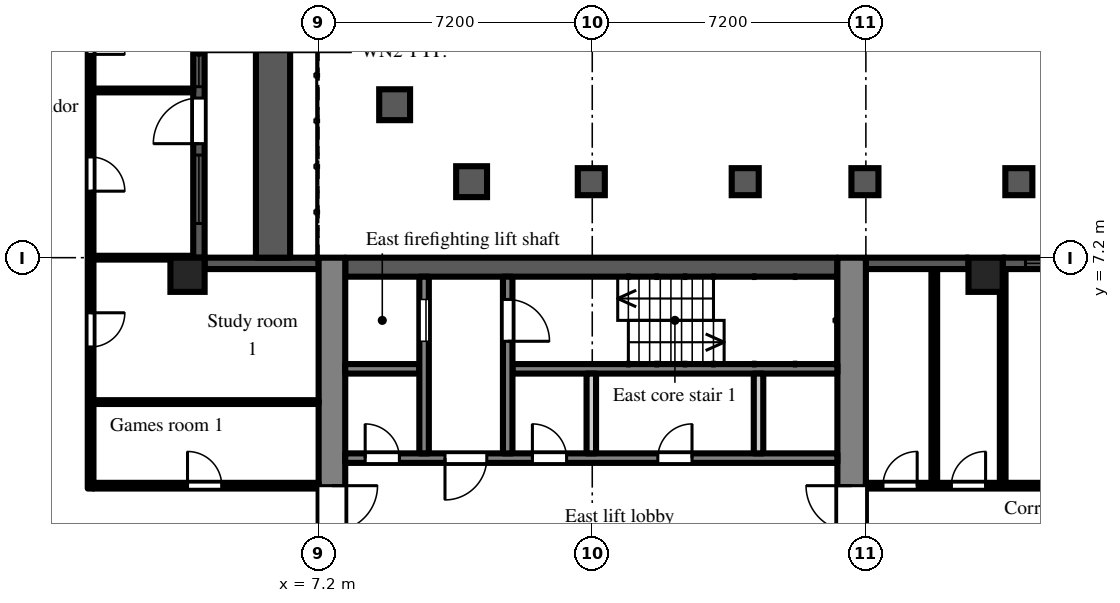
"""IFC4 building model, lengths in metres.
Left out: names, types, materials, properties, quantities, classifications, styles, units other than length and angle.
Written with IfcOpenShell. Run it as: python <this file> out.ifc"""

import sys

from ifc_helpers import new_model, si_unit, direction, frame, frame_2d, origin, origin_2d, place, context, subcontext, project, spatial, rectangle, extrude, element, fill, save


model = new_model("IFC4")
c1 = context("Model", 3, precision=1e-05, world=origin(), true_north=direction((0.0, 1.0)))
c2 = subcontext(c1, "Body", "Model", "MODEL_VIEW")
j1 = project(units=[si_unit("LENGTHUNIT", "METRE"), si_unit("PLANEANGLEUNIT", "RADIAN")], contexts=[c1])
p1 = place(None, origin())
s1 = spatial("IfcSite", under=j1, at=p1, CompositionType="ELEMENT")
p2 = place(p1, origin())
s2 = spatial("IfcBuilding", under=s1, at=p2, CompositionType="ELEMENT")
p3 = place(p2, frame((0.0, 0.0, 108.9)))
s3 = spatial("IfcBuildingStorey", under=s2, at=p3, CompositionType="ELEMENT", Elevation=108.9)
for number, where, z_axis, x_axis in (
    (1, (3.75, 6.75, 0.0), (0.0, 0.0, 1.0), (1.0, 0.0, 0.0)),
    (2, (24.75, 6.75, 0.0), (0.0, 0.0, 1.0), (1.0, 0.0, 0.0)),
):
    element("IfcColumn", number, at=place(p3, frame(where, z_axis=z_axis, x_axis=x_axis)), inside=s3, PredefinedType="COLUMN", context=c2, shape_type="SweptSolid", body=[
        extrude(rectangle(XDim=0.9, YDim=0.9, at=origin_2d()), origin(), (0.0, 0.0, 1.0), 3.0),
    ])
p4 = place(p3, frame((28.35, 7.05, 0.0), z_axis=(0.0, 0.0, 1.0), x_axis=(-1.0, 0.0, 0.0)))
e3 = element("IfcWall", 3, at=p4, inside=s3, PredefinedType="SOLIDWALL", context=c2, shape_type="SweptSolid", body=[
    extrude(rectangle(XDim=3.15, YDim=0.3, at=frame_2d((1.575, 0.0))), origin(), (0.0, 0.0, 1.0), 2.2),
])
p5 = place(p4, frame((0.15, 0.0, 0.2)))
e4 = element("IfcOpeningElement", 4, at=p5, cuts=e3, PredefinedType="OPENING", context=c2, shape_type="SweptSolid", body=[
    extrude(rectangle(XDim=2.4, YDim=1.85, at=frame_2d((1.2, 0.925))), frame((0.0, 0.16, 0.0), z_axis=(0.0, -1.0, 0.0), x_axis=(1.0, 0.0, 0.0)), (0.0, 0.0, 1.0), 0.32),
])
p6 = place(p3, frame((24.3, 7.05, 0.0), z_axis=(0.0, 0.0, 1.0), x_axis=(-1.0, 0.0, 0.0)))
e5 = element("IfcWall", 5, at=p6, inside=s3, PredefinedType="SOLIDWALL", context=c2, shape_type="SweptSolid", body=[
    extrude(rectangle(XDim=2.7, YDim=0.3, at=frame_2d((1.35, 0.0))), origin(), (0.0, 0.0, 1.0), 2.2),
])
p7 = place(p3, frame((7.2, 7.05, 0.0), z_axis=(0.0, 0.0, 1.0), x_axis=(-1.0, 0.0, 0.0)))
e6 = element("IfcWall", 6, at=p7, inside=s3, PredefinedType="SOLIDWALL", context=c2, shape_type="SweptSolid", body=[
    extrude(rectangle(XDim=3.0, YDim=0.3, at=frame_2d((1.5, 0.0))), origin(), (0.0, 0.0, 1.0), 2.55),
])
p8 = place(p3, frame((4.05, 7.2, 0.0), z_axis=(0.0, 0.0, 1.0), x_axis=(0.0, 1.0, 0.0)))
e7 = element("IfcWall", 7, at=p8, inside=s3, PredefinedType="SOLIDWALL", context=c2, shape_type="SweptSolid", body=[
    extrude(rectangle(XDim=7.2, YDim=0.3, at=frame_2d((3.6, 0.0))), origin(), (0.0, 0.0, 1.0), 2.55),
])
p9 = place(p8, frame((3.0, 0.0, 0.0)))
e8 = element("IfcOpeningElement", 8, at=p9, cuts=e7, PredefinedType="OPENING", context=c2, shape_type="SweptSolid", body=[
    extrude(rectangle(XDim=1.2, YDim=2.05, at=frame_2d((0.6, 1.025))), frame((0.0, 0.16, 0.0), z_axis=(0.0, -1.0, 0.0), x_axis=(1.0, 0.0, 0.0)), (0.0, 0.0, 1.0), 0.32),
])
p10 = place(p8, frame((0.9, 0.0, 0.2)))
e9 = element("IfcOpeningElement", 9, at=p10, cuts=e7, PredefinedType="OPENING", context=c2, shape_type="SweptSolid", body=[
    extrude(rectangle(XDim=1.8, YDim=1.85, at=frame_2d((0.9, 0.925))), frame((0.0, 0.16, 0.0), z_axis=(0.0, -1.0, 0.0), x_axis=(1.0, 0.0, 0.0)), (0.0, 0.0, 1.0), 0.32),
])
p11 = place(p8, frame((4.5, 0.0, 0.2)))
e10 = element("IfcOpeningElement", 10, at=p11, cuts=e7, PredefinedType="OPENING", context=c2, shape_type="SweptSolid", body=[
    extrude(rectangle(XDim=1.8, YDim=1.85, at=frame_2d((0.9, 0.925))), frame((0.0, 0.16, 0.0), z_axis=(0.0, -1.0, 0.0), x_axis=(1.0, 0.0, 0.0)), (0.0, 0.0, 1.0), 0.32),
])
p12 = place(p3, frame((6.0, 7.2, 0.0), z_axis=(0.0, 0.0, 1.0), x_axis=(0.0, 1.0, 0.0)))
e11 = element("IfcWall", 11, at=p12, inside=s3, PredefinedType="PARAPET", context=c2, shape_type="SweptSolid", body=[
    extrude(rectangle(XDim=7.2, YDim=0.9, at=frame_2d((3.6, 0.0))), origin(), (0.0, 0.0, 1.0), 0.8),
])
p13 = place(p3, frame((7.55, -7.2, 0.0), z_axis=(0.0, 0.0, 1.0), x_axis=(0.0, 1.0, 0.0)))
e12 = element("IfcWall", 12, at=p13, inside=s3, PredefinedType="SHEAR", context=c2, shape_type="SweptSolid", body=[
    extrude(rectangle(XDim=14.4, YDim=0.7, at=frame_2d((7.2, 0.0))), origin(), (0.0, 0.0, 1.0), 2.55),
])
p14 = place(p13, frame((6.0, 0.0, 0.0)))
e13 = element("IfcOpeningElement", 13, at=p14, cuts=e12, PredefinedType="OPENING", context=c2, shape_type="SweptSolid", body=[
    extrude(rectangle(XDim=2.4, YDim=2.2, at=frame_2d((1.2, 1.1))), frame((0.0, 0.36, 0.0), z_axis=(0.0, -1.0, 0.0), x_axis=(1.0, 0.0, 0.0)), (0.0, 0.0, 1.0), 0.72),
])
p15 = place(p3, frame((21.225, -7.2, 0.0), z_axis=(0.0, 0.0, 1.0), x_axis=(0.0, 1.0, 0.0)))
e14 = element("IfcWall", 14, at=p15, inside=s3, PredefinedType="SHEAR", context=c2, shape_type="SweptSolid", body=[
    extrude(rectangle(XDim=14.4, YDim=0.75, at=frame_2d((7.2, 0.0))), origin(), (0.0, 0.0, 1.0), 2.55),
])
p16 = place(p15, frame((6.0, 0.0, 0.0)))
e15 = element("IfcOpeningElement", 15, at=p16, cuts=e14, PredefinedType="OPENING", context=c2, shape_type="SweptSolid", body=[
    extrude(rectangle(XDim=2.4, YDim=2.2, at=frame_2d((1.2, 1.1))), frame((0.0, 0.385, 0.0), z_axis=(0.0, -1.0, 0.0), x_axis=(1.0, 0.0, 0.0)), (0.0, 0.0, 1.0), 0.77),
])
p17 = place(p3, frame((7.9, 6.95, 0.0), z_axis=(0.0, 0.0, 1.0), x_axis=(1.0, 0.0, 0.0)))
e16 = element("IfcWall", 16, at=p17, inside=s3, PredefinedType="SHEAR", context=c2, shape_type="SweptSolid", body=[
    extrude(rectangle(XDim=12.95, YDim=0.5, at=frame_2d((6.475, 0.0))), origin(), (0.0, 0.0, 1.0), 2.55),
])
p18 = place(p3, frame((7.9, 1.925, 0.0), z_axis=(0.0, 0.0, 1.0), x_axis=(1.0, 0.0, 0.0)))
e17 = element("IfcWall", 17, at=p18, inside=s3, PredefinedType="SHEAR", context=c2, shape_type="SweptSolid", body=[
    extrude(rectangle(XDim=12.95, YDim=0.25, at=frame_2d((6.475, 0.0))), origin(), (0.0, 0.0, 1.0), 2.55),
])
p19 = place(p18, frame((0.525, 0.0, 0.0)))
e18 = element("IfcOpeningElement", 18, at=p19, cuts=e17, PredefinedType="OPENING", context=c2, shape_type="SweptSolid", body=[
    extrude(rectangle(XDim=0.9, YDim=2.1, at=frame_2d((0.45, 1.05))), frame((0.0, 0.135, 0.0), z_axis=(0.0, -1.0, 0.0), x_axis=(1.0, 0.0, 0.0)), (0.0, 0.0, 1.0), 0.27),
])
p20 = place(p18, frame((2.625, 0.0, 0.0)))
e19 = element("IfcOpeningElement", 19, at=p20, cuts=e17, PredefinedType="OPENING", context=c2, shape_type="SweptSolid", body=[
    extrude(rectangle(XDim=1.1, YDim=2.1, at=frame_2d((0.55, 1.05))), frame((0.0, 0.135, 0.0), z_axis=(0.0, -1.0, 0.0), x_axis=(1.0, 0.0, 0.0)), (0.0, 0.0, 1.0), 0.27),
])
p21 = place(p18, frame((4.925, 0.0, 0.0)))
e20 = element("IfcOpeningElement", 20, at=p21, cuts=e17, PredefinedType="OPENING", context=c2, shape_type="SweptSolid", body=[
    extrude(rectangle(XDim=0.9, YDim=2.1, at=frame_2d((0.45, 1.05))), frame((0.0, 0.135, 0.0), z_axis=(0.0, -1.0, 0.0), x_axis=(1.0, 0.0, 0.0)), (0.0, 0.0, 1.0), 0.27),
])
p22 = place(p18, frame((8.225, 0.0, 0.0)))
e21 = element("IfcOpeningElement", 21, at=p22, cuts=e17, PredefinedType="OPENING", context=c2, shape_type="SweptSolid", body=[
    extrude(rectangle(XDim=0.9, YDim=2.1, at=frame_2d((0.45, 1.05))), frame((0.0, 0.135, 0.0), z_axis=(0.0, -1.0, 0.0), x_axis=(1.0, 0.0, 0.0)), (0.0, 0.0, 1.0), 0.27),
])
p23 = place(p3, frame((7.9, 4.275, 0.0), z_axis=(0.0, 0.0, 1.0), x_axis=(1.0, 0.0, 0.0)))
e22 = element("IfcWall", 22, at=p23, inside=s3, PredefinedType="SHEAR", context=c2, shape_type="SweptSolid", body=[
    extrude(rectangle(XDim=1.95, YDim=0.25, at=frame_2d((0.975, 0.0))), origin(), (0.0, 0.0, 1.0), 2.55),
])
p24 = place(p3, frame((12.3, 4.275, 0.0), z_axis=(0.0, 0.0, 1.0), x_axis=(1.0, 0.0, 0.0)))
e23 = element("IfcWall", 23, at=p24, inside=s3, PredefinedType="SHEAR", context=c2, shape_type="SweptSolid", body=[
    extrude(rectangle(XDim=8.55, YDim=0.25, at=frame_2d((4.275, 0.0))), origin(), (0.0, 0.0, 1.0), 2.55),
])
p25 = place(p3, frame((9.975, 2.05, 0.0), z_axis=(0.0, 0.0, 1.0), x_axis=(0.0, 1.0, 0.0)))
e24 = element("IfcWall", 24, at=p25, inside=s3, PredefinedType="SHEAR", context=c2, shape_type="SweptSolid", body=[
    extrude(rectangle(XDim=4.65, YDim=0.25, at=frame_2d((2.325, 0.0))), origin(), (0.0, 0.0, 1.0), 2.55),
])
p26 = place(p25, frame((2.95, 0.0, 0.0)))
e25 = element("IfcOpeningElement", 25, at=p26, cuts=e24, PredefinedType="OPENING", context=c2, shape_type="SweptSolid", body=[
    extrude(rectangle(XDim=1.1, YDim=2.1, at=frame_2d((0.55, 1.05))), frame((0.0, 0.135, 0.0), z_axis=(0.0, -1.0, 0.0), x_axis=(1.0, 0.0, 0.0)), (0.0, 0.0, 1.0), 0.27),
])
p27 = place(p3, frame((12.175, 2.05, 0.0), z_axis=(0.0, 0.0, 1.0), x_axis=(0.0, 1.0, 0.0)))
e26 = element("IfcWall", 26, at=p27, inside=s3, PredefinedType="SHEAR", context=c2, shape_type="SweptSolid", body=[
    extrude(rectangle(XDim=4.65, YDim=0.25, at=frame_2d((2.325, 0.0))), origin(), (0.0, 0.0, 1.0), 2.55),
])
p28 = place(p27, frame((2.95, 0.0, 0.0)))
e27 = element("IfcOpeningElement", 27, at=p28, cuts=e26, PredefinedType="OPENING", context=c2, shape_type="SweptSolid", body=[
    extrude(rectangle(XDim=1.1, YDim=2.1, at=frame_2d((0.55, 1.05))), frame((0.0, 0.135, 0.0), z_axis=(0.0, -1.0, 0.0), x_axis=(1.0, 0.0, 0.0)), (0.0, 0.0, 1.0), 0.27),
])
for number, where, z_axis, x_axis in (
    (28, (14.375, 2.05, 0.0), (0.0, 0.0, 1.0), (0.0, 1.0, 0.0)),
    (29, (18.775, 2.05, 0.0), (0.0, 0.0, 1.0), (0.0, 1.0, 0.0)),
):
    element("IfcWall", number, at=place(p3, frame(where, z_axis=z_axis, x_axis=x_axis)), inside=s3, PredefinedType="PARTITIONING", context=c2, shape_type="SweptSolid", body=[
        extrude(rectangle(XDim=2.1, YDim=0.25, at=frame_2d((1.05, 0.0))), origin(), (0.0, 0.0, 1.0), 2.55),
    ])
p29 = place(p3, frame((1.2, 1.125, 0.0), z_axis=(0.0, 0.0, 1.0), x_axis=(0.0, 1.0, 0.0)))
e30 = element("IfcWall", 30, at=p29, inside=s3, PredefinedType="PARTITIONING", context=c2, shape_type="SweptSolid", body=[
    extrude(rectangle(XDim=16.8, YDim=0.15, at=frame_2d((8.4, 0.0))), origin(), (0.0, 0.0, 1.0), 2.55),
])
p30 = place(p29, frame((3.725, 0.0, 0.0)))
e31 = element("IfcOpeningElement", 31, at=p30, cuts=e30, PredefinedType="OPENING", context=c2, shape_type="SweptSolid", body=[
    extrude(rectangle(XDim=0.9, YDim=2.1, at=frame_2d((0.45, 1.05))), frame((0.0, 0.085, 0.0), z_axis=(0.0, -1.0, 0.0), x_axis=(1.0, 0.0, 0.0)), (0.0, 0.0, 1.0), 0.17),
])
p31 = place(p29, frame((11.425, 0.0, 0.0)))
e32 = element("IfcOpeningElement", 32, at=p31, cuts=e30, PredefinedType="OPENING", context=c2, shape_type="SweptSolid", body=[
    extrude(rectangle(XDim=0.9, YDim=2.1, at=frame_2d((0.45, 1.05))), frame((0.0, 0.085, 0.0), z_axis=(0.0, -1.0, 0.0), x_axis=(1.0, 0.0, 0.0)), (0.0, 0.0, 1.0), 0.17),
])
p32 = place(p29, frame((7.825, 0.0, 0.0)))
e33 = element("IfcOpeningElement", 33, at=p32, cuts=e30, PredefinedType="OPENING", context=c2, shape_type="SweptSolid", body=[
    extrude(rectangle(XDim=0.9, YDim=2.1, at=frame_2d((0.45, 1.05))), frame((0.0, 0.085, 0.0), z_axis=(0.0, -1.0, 0.0), x_axis=(1.0, 0.0, 0.0)), (0.0, 0.0, 1.0), 0.17),
])
p33 = place(p29, frame((13.475, 0.0, 0.0)))
e34 = element("IfcOpeningElement", 34, at=p33, cuts=e30, PredefinedType="OPENING", context=c2, shape_type="SweptSolid", body=[
    extrude(rectangle(XDim=1.0, YDim=2.1, at=frame_2d((0.5, 1.05))), frame((0.0, 0.085, 0.0), z_axis=(0.0, -1.0, 0.0), x_axis=(1.0, 0.0, 0.0)), (0.0, 0.0, 1.0), 0.17),
])
p34 = place(p3, frame((1.275, 1.2, 0.0), z_axis=(0.0, 0.0, 1.0), x_axis=(1.0, 0.0, 0.0)))
e35 = element("IfcWall", 35, at=p34, inside=s3, PredefinedType="PARTITIONING", context=c2, shape_type="SweptSolid", body=[
    extrude(rectangle(XDim=5.925, YDim=0.15, at=frame_2d((2.962, 0.0))), origin(), (0.0, 0.0, 1.0), 2.55),
])
p35 = place(p34, frame((2.475, 0.0, 0.0)))
e36 = element("IfcOpeningElement", 36, at=p35, cuts=e35, PredefinedType="OPENING", context=c2, shape_type="SweptSolid", body=[
    extrude(rectangle(XDim=0.9, YDim=2.1, at=frame_2d((0.45, 1.05))), frame((0.0, 0.085, 0.0), z_axis=(0.0, -1.0, 0.0), x_axis=(1.0, 0.0, 0.0)), (0.0, 0.0, 1.0), 0.17),
])
p36 = place(p3, frame((1.275, 3.4, 0.0), z_axis=(0.0, 0.0, 1.0), x_axis=(1.0, 0.0, 0.0)))
e37 = element("IfcWall", 37, at=p36, inside=s3, PredefinedType="PARTITIONING", context=c2, shape_type="SweptSolid", body=[
    extrude(rectangle(XDim=5.925, YDim=0.1, at=frame_2d((2.962, 0.0))), origin(), (0.0, 0.0, 1.0), 2.55),
])
for number, where, z_axis, x_axis in (
    (38, (1.275, 7.2, 0.0), (0.0, 0.0, 1.0), (1.0, 0.0, 0.0)),
    (39, (1.275, 11.6, 0.0), (0.0, 0.0, 1.0), (1.0, 0.0, 0.0)),
):
    element("IfcWall", number, at=place(p3, frame(where, z_axis=z_axis, x_axis=x_axis)), inside=s3, PredefinedType="PARTITIONING", context=c2, shape_type="SweptSolid", body=[
        extrude(rectangle(XDim=2.625, YDim=0.1, at=frame_2d((1.312, 0.0))), origin(), (0.0, 0.0, 1.0), 2.55),
    ])
p37 = place(p3, frame((21.6, 1.2, 0.0), z_axis=(0.0, 0.0, 1.0), x_axis=(1.0, 0.0, 0.0)))
e40 = element("IfcWall", 40, at=p37, inside=s3, PredefinedType="PARTITIONING", context=c2, shape_type="SweptSolid", body=[
    extrude(rectangle(XDim=14.9, YDim=0.15, at=frame_2d((7.45, 0.0))), origin(), (0.0, 0.0, 1.0), 2.55),
])
p38 = place(p37, frame((0.45, 0.0, 0.0)))
e41 = element("IfcOpeningElement", 41, at=p38, cuts=e40, PredefinedType="OPENING", context=c2, shape_type="SweptSolid", body=[
    extrude(rectangle(XDim=0.9, YDim=2.1, at=frame_2d((0.45, 1.05))), frame((0.0, 0.085, 0.0), z_axis=(0.0, -1.0, 0.0), x_axis=(1.0, 0.0, 0.0)), (0.0, 0.0, 1.0), 0.17),
])
p39 = place(p37, frame((2.25, 0.0, 0.0)))
e42 = element("IfcOpeningElement", 42, at=p39, cuts=e40, PredefinedType="OPENING", context=c2, shape_type="SweptSolid", body=[
    extrude(rectangle(XDim=0.9, YDim=2.1, at=frame_2d((0.45, 1.05))), frame((0.0, 0.085, 0.0), z_axis=(0.0, -1.0, 0.0), x_axis=(1.0, 0.0, 0.0)), (0.0, 0.0, 1.0), 0.17),
])
p40 = place(p37, frame((6.3, 0.0, 0.0)))
e43 = element("IfcOpeningElement", 43, at=p40, cuts=e40, PredefinedType="OPENING", context=c2, shape_type="SweptSolid", body=[
    extrude(rectangle(XDim=1.8, YDim=2.1, at=frame_2d((0.9, 1.05))), frame((0.0, 0.085, 0.0), z_axis=(0.0, -1.0, 0.0), x_axis=(1.0, 0.0, 0.0)), (0.0, 0.0, 1.0), 0.17),
])
p41 = place(p37, frame((11.95, 0.0, 0.0)))
e44 = element("IfcOpeningElement", 44, at=p41, cuts=e40, PredefinedType="OPENING", context=c2, shape_type="SweptSolid", body=[
    extrude(rectangle(XDim=1.8, YDim=2.1, at=frame_2d((0.9, 1.05))), frame((0.0, 0.085, 0.0), z_axis=(0.0, -1.0, 0.0), x_axis=(1.0, 0.0, 0.0)), (0.0, 0.0, 1.0), 0.17),
])
for number, where, z_axis, x_axis in (
    (45, (23.4, 1.275, 0.0), (0.0, 0.0, 1.0), (0.0, 1.0, 0.0)),
    (46, (25.2, 1.275, 0.0), (0.0, 0.0, 1.0), (0.0, 1.0, 0.0)),
):
    element("IfcWall", number, at=place(p3, frame(where, z_axis=z_axis, x_axis=x_axis)), inside=s3, PredefinedType="PARTITIONING", context=c2, shape_type="SweptSolid", body=[
        extrude(rectangle(XDim=5.625, YDim=0.15, at=frame_2d((2.812, 0.0))), origin(), (0.0, 0.0, 1.0), 2.55),
    ])
p42 = place(p5, origin())
e47 = element("IfcWindow", 47, at=p42, inside=s3, PartitioningType="SINGLE_PANEL", PredefinedType="WINDOW", context=c2, shape_type="SweptSolid", body=[
    extrude(rectangle(XDim=2.4, YDim=1.85, at=frame_2d((1.2, 0.925))), frame((0.0, 0.03, 0.0), z_axis=(0.0, -1.0, 0.0), x_axis=(1.0, 0.0, 0.0)), (0.0, 0.0, 1.0), 0.06),
])
fill(e4, e47)
p43 = place(p9, origin())
e48 = element("IfcDoor", 48, at=p43, inside=s3, OperationType="SINGLE_SWING_LEFT", PredefinedType="DOOR", context=c2, shape_type="SweptSolid", body=[
    extrude(rectangle(XDim=1.2, YDim=2.05, at=frame_2d((0.6, 1.025))), frame((0.0, 0.025, 0.0), z_axis=(0.0, -1.0, 0.0), x_axis=(1.0, 0.0, 0.0)), (0.0, 0.0, 1.0), 0.05),
])
fill(e8, e48)
p44 = place(p10, origin())
e49 = element("IfcWindow", 49, at=p44, inside=s3, PartitioningType="SINGLE_PANEL", PredefinedType="WINDOW", context=c2, shape_type="SweptSolid", body=[
    extrude(rectangle(XDim=1.8, YDim=1.85, at=frame_2d((0.9, 0.925))), frame((0.0, 0.03, 0.0), z_axis=(0.0, -1.0, 0.0), x_axis=(1.0, 0.0, 0.0)), (0.0, 0.0, 1.0), 0.06),
])
fill(e9, e49)
p45 = place(p11, origin())
e50 = element("IfcWindow", 50, at=p45, inside=s3, PartitioningType="SINGLE_PANEL", PredefinedType="WINDOW", context=c2, shape_type="SweptSolid", body=[
    extrude(rectangle(XDim=1.8, YDim=1.85, at=frame_2d((0.9, 0.925))), frame((0.0, 0.03, 0.0), z_axis=(0.0, -1.0, 0.0), x_axis=(1.0, 0.0, 0.0)), (0.0, 0.0, 1.0), 0.06),
])
fill(e10, e50)
p46 = place(p26, origin())
e51 = element("IfcDoor", 51, at=p46, inside=s3, OperationType="SLIDING_TO_LEFT", PredefinedType="DOOR", context=c2, shape_type="SweptSolid", body=[
    extrude(rectangle(XDim=1.1, YDim=2.1, at=frame_2d((0.55, 1.05))), frame((0.0, 0.025, 0.0), z_axis=(0.0, -1.0, 0.0), x_axis=(1.0, 0.0, 0.0)), (0.0, 0.0, 1.0), 0.05),
])
fill(e25, e51)
p47 = place(p28, frame((1.1, 0.0, 0.0), z_axis=(0.0, 0.0, 1.0), x_axis=(-1.0, 0.0, 0.0)))
e52 = element("IfcDoor", 52, at=p47, inside=s3, OperationType="SINGLE_SWING_RIGHT", PredefinedType="DOOR", context=c2, shape_type="SweptSolid", body=[
    extrude(rectangle(XDim=1.1, YDim=2.1, at=frame_2d((0.55, 1.05))), frame((0.0, 0.025, 0.0), z_axis=(0.0, -1.0, 0.0), x_axis=(1.0, 0.0, 0.0)), (0.0, 0.0, 1.0), 0.05),
])
fill(e27, e52)
p48 = place(p19, origin())
e53 = element("IfcDoor", 53, at=p48, inside=s3, OperationType="SINGLE_SWING_LEFT", PredefinedType="DOOR", context=c2, shape_type="SweptSolid", body=[
    extrude(rectangle(XDim=0.9, YDim=2.1, at=frame_2d((0.45, 1.05))), frame((0.0, 0.025, 0.0), z_axis=(0.0, -1.0, 0.0), x_axis=(1.0, 0.0, 0.0)), (0.0, 0.0, 1.0), 0.05),
])
fill(e18, e53)
p49 = place(p20, frame((1.1, 0.0, 0.0), z_axis=(0.0, 0.0, 1.0), x_axis=(-1.0, 0.0, 0.0)))
e54 = element("IfcDoor", 54, at=p49, inside=s3, OperationType="SINGLE_SWING_RIGHT", PredefinedType="DOOR", context=c2, shape_type="SweptSolid", body=[
    extrude(rectangle(XDim=1.1, YDim=2.1, at=frame_2d((0.55, 1.05))), frame((0.0, 0.025, 0.0), z_axis=(0.0, -1.0, 0.0), x_axis=(1.0, 0.0, 0.0)), (0.0, 0.0, 1.0), 0.05),
])
fill(e19, e54)
p50 = place(p14, frame((2.4, 0.0, 0.0), z_axis=(0.0, 0.0, 1.0), x_axis=(-1.0, 0.0, 0.0)))
e55 = element("IfcDoor", 55, at=p50, inside=s3, OperationType="DOUBLE_DOOR_DOUBLE_SWING", PredefinedType="DOOR", context=c2, shape_type="SweptSolid", body=[
    extrude(rectangle(XDim=2.4, YDim=2.2, at=frame_2d((1.2, 1.1))), frame((0.0, 0.025, 0.0), z_axis=(0.0, -1.0, 0.0), x_axis=(1.0, 0.0, 0.0)), (0.0, 0.0, 1.0), 0.05),
])
fill(e13, e55)
p51 = place(p16, origin())
e56 = element("IfcDoor", 56, at=p51, inside=s3, OperationType="DOUBLE_DOOR_DOUBLE_SWING", PredefinedType="DOOR", context=c2, shape_type="SweptSolid", body=[
    extrude(rectangle(XDim=2.4, YDim=2.2, at=frame_2d((1.2, 1.1))), frame((0.0, 0.025, 0.0), z_axis=(0.0, -1.0, 0.0), x_axis=(1.0, 0.0, 0.0)), (0.0, 0.0, 1.0), 0.05),
])
fill(e15, e56)
p52 = place(p21, origin())
e57 = element("IfcDoor", 57, at=p52, inside=s3, OperationType="SINGLE_SWING_LEFT", PredefinedType="DOOR", context=c2, shape_type="SweptSolid", body=[
    extrude(rectangle(XDim=0.9, YDim=2.1, at=frame_2d((0.45, 1.05))), frame((0.0, 0.025, 0.0), z_axis=(0.0, -1.0, 0.0), x_axis=(1.0, 0.0, 0.0)), (0.0, 0.0, 1.0), 0.05),
])
fill(e20, e57)
p53 = place(p22, origin())
e58 = element("IfcDoor", 58, at=p53, inside=s3, OperationType="SINGLE_SWING_RIGHT", PredefinedType="DOOR", context=c2, shape_type="SweptSolid", body=[
    extrude(rectangle(XDim=0.9, YDim=2.1, at=frame_2d((0.45, 1.05))), frame((0.0, 0.025, 0.0), z_axis=(0.0, -1.0, 0.0), x_axis=(1.0, 0.0, 0.0)), (0.0, 0.0, 1.0), 0.05),
])
fill(e21, e58)
p54 = place(p35, origin())
e59 = element("IfcDoor", 59, at=p54, inside=s3, OperationType="SINGLE_SWING_LEFT", PredefinedType="DOOR", context=c2, shape_type="SweptSolid", body=[
    extrude(rectangle(XDim=0.9, YDim=2.1, at=frame_2d((0.45, 1.05))), frame((0.0, 0.025, 0.0), z_axis=(0.0, -1.0, 0.0), x_axis=(1.0, 0.0, 0.0)), (0.0, 0.0, 1.0), 0.05),
])
fill(e36, e59)
p55 = place(p30, frame((0.9, 0.0, 0.0), z_axis=(0.0, 0.0, 1.0), x_axis=(-1.0, 0.0, 0.0)))
e60 = element("IfcDoor", 60, at=p55, inside=s3, OperationType="SINGLE_SWING_LEFT", PredefinedType="DOOR", context=c2, shape_type="SweptSolid", body=[
    extrude(rectangle(XDim=0.9, YDim=2.1, at=frame_2d((0.45, 1.05))), frame((0.0, 0.025, 0.0), z_axis=(0.0, -1.0, 0.0), x_axis=(1.0, 0.0, 0.0)), (0.0, 0.0, 1.0), 0.05),
])
fill(e31, e60)
p56 = place(p38, origin())
e61 = element("IfcDoor", 61, at=p56, inside=s3, OperationType="SINGLE_SWING_RIGHT", PredefinedType="DOOR", context=c2, shape_type="SweptSolid", body=[
    extrude(rectangle(XDim=0.9, YDim=2.1, at=frame_2d((0.45, 1.05))), frame((0.0, 0.025, 0.0), z_axis=(0.0, -1.0, 0.0), x_axis=(1.0, 0.0, 0.0)), (0.0, 0.0, 1.0), 0.05),
])
fill(e41, e61)
p57 = place(p39, origin())
e62 = element("IfcDoor", 62, at=p57, inside=s3, OperationType="SINGLE_SWING_RIGHT", PredefinedType="DOOR", context=c2, shape_type="SweptSolid", body=[
    extrude(rectangle(XDim=0.9, YDim=2.1, at=frame_2d((0.45, 1.05))), frame((0.0, 0.025, 0.0), z_axis=(0.0, -1.0, 0.0), x_axis=(1.0, 0.0, 0.0)), (0.0, 0.0, 1.0), 0.05),
])
fill(e42, e62)
p58 = place(p31, frame((0.9, 0.0, 0.0), z_axis=(0.0, 0.0, 1.0), x_axis=(-1.0, 0.0, 0.0)))
e63 = element("IfcDoor", 63, at=p58, inside=s3, OperationType="SINGLE_SWING_RIGHT", PredefinedType="DOOR", context=c2, shape_type="SweptSolid", body=[
    extrude(rectangle(XDim=0.9, YDim=2.1, at=frame_2d((0.45, 1.05))), frame((0.0, 0.025, 0.0), z_axis=(0.0, -1.0, 0.0), x_axis=(1.0, 0.0, 0.0)), (0.0, 0.0, 1.0), 0.05),
])
fill(e32, e63)
p59 = place(p32, frame((0.9, 0.0, 0.0), z_axis=(0.0, 0.0, 1.0), x_axis=(-1.0, 0.0, 0.0)))
e64 = element("IfcDoor", 64, at=p59, inside=s3, OperationType="SINGLE_SWING_RIGHT", PredefinedType="DOOR", context=c2, shape_type="SweptSolid", body=[
    extrude(rectangle(XDim=0.9, YDim=2.1, at=frame_2d((0.45, 1.05))), frame((0.0, 0.025, 0.0), z_axis=(0.0, -1.0, 0.0), x_axis=(1.0, 0.0, 0.0)), (0.0, 0.0, 1.0), 0.05),
])
fill(e33, e64)
save(model, sys.argv[1])
